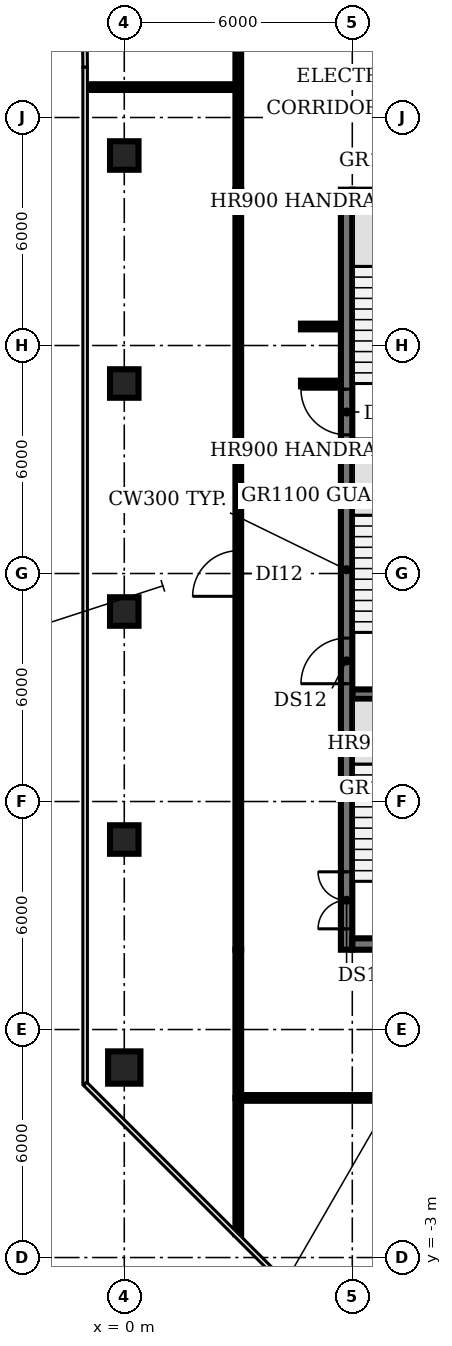
"""IFC4 building model, lengths in metres.
Left out: names, types, materials, properties, quantities, classifications, styles, units other than length and angle.
Written with IfcOpenShell. Run it as: python <this file> out.ifc"""

import sys

from ifc_helpers import new_model, si_unit, direction, frame, frame_2d, origin, origin_2d, place, context, subcontext, project, spatial, rectangle, circle, extrude, element, fill, save


model = new_model("IFC4")
c1 = context("Model", 3, precision=1e-05, world=origin(), true_north=direction((0.0, 1.0)))
c2 = subcontext(c1, "Body", "Model", "MODEL_VIEW")
j1 = project(units=[si_unit("LENGTHUNIT", "METRE"), si_unit("PLANEANGLEUNIT", "RADIAN")], contexts=[c1])
p1 = place(None, origin())
s1 = spatial("IfcSite", under=j1, at=p1, CompositionType="ELEMENT")
p2 = place(p1, origin())
s2 = spatial("IfcBuilding", under=s1, at=p2, CompositionType="ELEMENT")
p3 = place(p2, frame((0.0, 0.0, 289.4)))
s3 = spatial("IfcBuildingStorey", under=s2, at=p3, CompositionType="ELEMENT", Elevation=289.4)
p4 = place(p3, frame((0.0, 2.0, 0.0), z_axis=(0.0, 0.0, 1.0), x_axis=(1.0, 0.0, 0.0)))
e1 = element("IfcColumn", 1, at=p4, inside=s3, PredefinedType="COLUMN", context=c2, shape_type="SweptSolid", body=[
    extrude(circle(Radius=0.425, at=origin_2d()), origin(), (0.0, 0.0, 1.0), 3.85),
])
for number, where, z_axis, x_axis in (
    (2, (0.0, 8.0, 0.0), (0.0, 0.0, 1.0), (1.0, 0.0, 0.0)),
    (3, (0.0, 14.0, 0.0), (0.0, 0.0, 1.0), (1.0, 0.0, 0.0)),
    (4, (0.0, 20.0, 0.0), (0.0, 0.0, 1.0), (1.0, 0.0, 0.0)),
    (5, (0.0, 26.0, 0.0), (0.0, 0.0, 1.0), (1.0, 0.0, 0.0)),
):
    element("IfcColumn", number, at=place(p3, frame(where, z_axis=z_axis, x_axis=x_axis)), inside=s3, PredefinedType="COLUMN", context=c2, shape_type="SweptSolid", body=[
        extrude(rectangle(XDim=0.75, YDim=0.75, at=origin_2d()), origin(), (0.0, 0.0, 1.0), 3.85),
    ])
for number, where, z_axis, x_axis in (
    (6, (6.0, 11.825, 0.0), (0.0, 0.0, 1.0), (1.0, 0.0, 0.0)),
    (7, (6.0, 18.375, 0.0), (0.0, 0.0, 1.0), (1.0, 0.0, 0.0)),
):
    element("IfcWall", number, at=place(p3, frame(where, z_axis=z_axis, x_axis=x_axis)), inside=s3, PredefinedType="SHEAR", context=c2, shape_type="SweptSolid", body=[
        extrude(rectangle(XDim=3.15, YDim=0.25, at=frame_2d((1.575, 0.0))), origin(), (0.0, 0.0, 1.0), 3.85),
    ])
p5 = place(p3, frame((5.85, 5.1, 0.0), z_axis=(0.0, 0.0, 1.0), x_axis=(0.0, 1.0, 0.0)))
e8 = element("IfcWall", 8, at=p5, inside=s3, PredefinedType="SHEAR", context=c2, shape_type="SweptSolid", body=[
    extrude(rectangle(XDim=20.0, YDim=0.3, at=frame_2d((10.0, 0.0))), origin(), (0.0, 0.0, 1.0), 3.85),
])
p6 = place(p5, frame((0.55, 0.0, 0.0)))
e9 = element("IfcOpeningElement", 9, at=p6, cuts=e8, PredefinedType="OPENING", context=c2, shape_type="SweptSolid", body=[
    extrude(rectangle(XDim=1.5, YDim=2.1, at=frame_2d((0.75, 1.05))), frame((0.0, 0.16, 0.0), z_axis=(0.0, -1.0, 0.0), x_axis=(1.0, 0.0, 0.0)), (0.0, 0.0, 1.0), 0.32),
])
p7 = place(p5, frame((7.0, 0.0, 0.0)))
e10 = element("IfcOpeningElement", 10, at=p7, cuts=e8, PredefinedType="OPENING", context=c2, shape_type="SweptSolid", body=[
    extrude(rectangle(XDim=1.2, YDim=2.1, at=frame_2d((0.6, 1.05))), frame((0.0, 0.16, 0.0), z_axis=(0.0, -1.0, 0.0), x_axis=(1.0, 0.0, 0.0)), (0.0, 0.0, 1.0), 0.32),
])
p8 = place(p5, frame((13.55, 0.0, 0.0)))
e11 = element("IfcOpeningElement", 11, at=p8, cuts=e8, PredefinedType="OPENING", context=c2, shape_type="SweptSolid", body=[
    extrude(rectangle(XDim=1.2, YDim=2.1, at=frame_2d((0.6, 1.05))), frame((0.0, 0.16, 0.0), z_axis=(0.0, -1.0, 0.0), x_axis=(1.0, 0.0, 0.0)), (0.0, 0.0, 1.0), 0.32),
])
p9 = place(p3, frame((24.0, 5.25, 0.0), z_axis=(0.0, 0.0, 1.0), x_axis=(-1.0, 0.0, 0.0)))
e12 = element("IfcWall", 12, at=p9, inside=s3, PredefinedType="SHEAR", context=c2, shape_type="SweptSolid", body=[
    extrude(rectangle(XDim=18.0, YDim=0.3, at=frame_2d((9.0, 0.0))), origin(), (0.0, 0.0, 1.0), 3.85),
])
p10 = place(p9, frame((13.0, 0.0, 0.0)))
e13 = element("IfcOpeningElement", 13, at=p10, cuts=e12, PredefinedType="OPENING", context=c2, shape_type="SweptSolid", body=[
    extrude(rectangle(XDim=1.2, YDim=2.1, at=frame_2d((0.6, 1.05))), frame((0.0, 0.16, 0.0), z_axis=(0.0, -1.0, 0.0), x_axis=(1.0, 0.0, 0.0)), (0.0, 0.0, 1.0), 0.32),
])
p11 = place(p9, frame((4.9, 0.0, 0.0)))
e14 = element("IfcOpeningElement", 14, at=p11, cuts=e12, PredefinedType="OPENING", context=c2, shape_type="SweptSolid", body=[
    extrude(rectangle(XDim=1.0, YDim=2.1, at=frame_2d((0.5, 1.05))), frame((0.0, 0.16, 0.0), z_axis=(0.0, -1.0, 0.0), x_axis=(1.0, 0.0, 0.0)), (0.0, 0.0, 1.0), 0.32),
])
p12 = place(p3, frame((6.0, 24.95, 0.0), z_axis=(0.0, 0.0, 1.0), x_axis=(1.0, 0.0, 0.0)))
e15 = element("IfcWall", 15, at=p12, inside=s3, PredefinedType="SHEAR", context=c2, shape_type="SweptSolid", body=[
    extrude(rectangle(XDim=18.0, YDim=0.3, at=frame_2d((9.0, 0.0))), origin(), (0.0, 0.0, 1.0), 3.85),
])
p13 = place(p3, frame((-0.98, 27.8, 0.0), z_axis=(0.0, 0.0, 1.0), x_axis=(1.0, 0.0, 0.0)))
e16 = element("IfcWall", 16, at=p13, inside=s3, PredefinedType="PARTITIONING", context=c2, shape_type="SweptSolid", body=[
    extrude(rectangle(XDim=3.98, YDim=0.15, at=frame_2d((1.99, 0.0))), origin(), (0.0, 0.0, 1.0), 2.9),
])
p14 = place(p3, frame((3.0, -2.39, 0.0), z_axis=(0.0, 0.0, 1.0), x_axis=(0.0, 1.0, 0.0)))
e17 = element("IfcWall", 17, at=p14, inside=s3, PredefinedType="PARTITIONING", context=c2, shape_type="SweptSolid", body=[
    extrude(rectangle(XDim=3.59, YDim=0.15, at=frame_2d((1.795, 0.0))), origin(), (0.0, 0.0, 1.0), 2.9),
])
p15 = place(p3, frame((3.0, 1.2, 0.0), z_axis=(0.0, 0.0, 1.0), x_axis=(0.0, 1.0, 0.0)))
e18 = element("IfcWall", 18, at=p15, inside=s3, PredefinedType="PARTITIONING", context=c2, shape_type="SweptSolid", body=[
    extrude(rectangle(XDim=3.9, YDim=0.15, at=frame_2d((1.95, 0.0))), origin(), (0.0, 0.0, 1.0), 2.9),
])
p16 = place(p3, frame((3.0, 5.1, 0.0), z_axis=(0.0, 0.0, 1.0), x_axis=(0.0, 1.0, 0.0)))
e19 = element("IfcWall", 19, at=p16, inside=s3, PredefinedType="PARTITIONING", context=c2, shape_type="SweptSolid", body=[
    extrude(rectangle(XDim=20.0, YDim=0.15, at=frame_2d((10.0, 0.0))), origin(), (0.0, 0.0, 1.0), 2.9),
])
p17 = place(p16, frame((9.3, 0.0, 0.0)))
e20 = element("IfcOpeningElement", 20, at=p17, cuts=e19, PredefinedType="OPENING", context=c2, shape_type="SweptSolid", body=[
    extrude(rectangle(XDim=1.2, YDim=2.1, at=frame_2d((0.6, 1.05))), frame((0.0, 0.085, 0.0), z_axis=(0.0, -1.0, 0.0), x_axis=(1.0, 0.0, 0.0)), (0.0, 0.0, 1.0), 0.17),
])
p18 = place(p3, frame((3.0, 25.1, 0.0), z_axis=(0.0, 0.0, 1.0), x_axis=(0.0, 1.0, 0.0)))
e21 = element("IfcWall", 21, at=p18, inside=s3, PredefinedType="PARTITIONING", context=c2, shape_type="SweptSolid", body=[
    extrude(rectangle(XDim=3.9, YDim=0.15, at=frame_2d((1.95, 0.0))), origin(), (0.0, 0.0, 1.0), 2.9),
])
for number, where, z_axis, x_axis in (
    (22, (4.65, 20.0, 0.0), (0.0, 0.0, 1.0), (1.0, 0.0, 0.0)),
    (23, (4.65, 21.5, 0.0), (0.0, 0.0, 1.0), (1.0, 0.0, 0.0)),
):
    element("IfcWall", number, at=place(p3, frame(where, z_axis=z_axis, x_axis=x_axis)), inside=s3, PredefinedType="PARTITIONING", context=c2, shape_type="SweptSolid", body=[
        extrude(rectangle(XDim=1.05, YDim=0.15, at=frame_2d((0.525, 0.0))), origin(), (0.0, 0.0, 1.0), 2.9),
    ])
p19 = place(p3, frame((27.0, 1.2, 0.0), z_axis=(0.0, 0.0, 1.0), x_axis=(-1.0, 0.0, 0.0)))
e24 = element("IfcWall", 24, at=p19, inside=s3, PredefinedType="PARTITIONING", context=c2, shape_type="SweptSolid", body=[
    extrude(rectangle(XDim=24.0, YDim=0.15, at=frame_2d((12.0, 0.0))), origin(), (0.0, 0.0, 1.0), 2.9),
])
p20 = place(p19, frame((11.5, 0.0, 0.0)))
e25 = element("IfcOpeningElement", 25, at=p20, cuts=e24, PredefinedType="OPENING", context=c2, shape_type="SweptSolid", body=[
    extrude(rectangle(XDim=1.2, YDim=2.1, at=frame_2d((0.6, 1.05))), frame((0.0, 0.085, 0.0), z_axis=(0.0, -1.0, 0.0), x_axis=(1.0, 0.0, 0.0)), (0.0, 0.0, 1.0), 0.17),
])
p21 = place(p6, origin())
e26 = element("IfcDoor", 26, at=p21, inside=s3, OperationType="DOUBLE_DOOR_SINGLE_SWING", PredefinedType="DOOR", context=c2, shape_type="SweptSolid", body=[
    extrude(rectangle(XDim=1.5, YDim=2.1, at=frame_2d((0.75, 1.05))), frame((0.0, 0.025, 0.0), z_axis=(0.0, -1.0, 0.0), x_axis=(1.0, 0.0, 0.0)), (0.0, 0.0, 1.0), 0.05),
])
fill(e9, e26)
p22 = place(p7, origin())
e27 = element("IfcDoor", 27, at=p22, inside=s3, OperationType="SINGLE_SWING_LEFT", PredefinedType="DOOR", context=c2, shape_type="SweptSolid", body=[
    extrude(rectangle(XDim=1.2, YDim=2.1, at=frame_2d((0.6, 1.05))), frame((0.0, 0.025, 0.0), z_axis=(0.0, -1.0, 0.0), x_axis=(1.0, 0.0, 0.0)), (0.0, 0.0, 1.0), 0.05),
])
fill(e10, e27)
p23 = place(p8, origin())
e28 = element("IfcDoor", 28, at=p23, inside=s3, OperationType="SINGLE_SWING_RIGHT", PredefinedType="DOOR", context=c2, shape_type="SweptSolid", body=[
    extrude(rectangle(XDim=1.2, YDim=2.1, at=frame_2d((0.6, 1.05))), frame((0.0, 0.025, 0.0), z_axis=(0.0, -1.0, 0.0), x_axis=(1.0, 0.0, 0.0)), (0.0, 0.0, 1.0), 0.05),
])
fill(e11, e28)
p24 = place(p17, origin())
e29 = element("IfcDoor", 29, at=p24, inside=s3, OperationType="SINGLE_SWING_LEFT", PredefinedType="DOOR", context=c2, shape_type="SweptSolid", body=[
    extrude(rectangle(XDim=1.2, YDim=2.1, at=frame_2d((0.6, 1.05))), frame((0.0, 0.025, 0.0), z_axis=(0.0, -1.0, 0.0), x_axis=(1.0, 0.0, 0.0)), (0.0, 0.0, 1.0), 0.05),
])
fill(e20, e29)
save(model, sys.argv[1])
